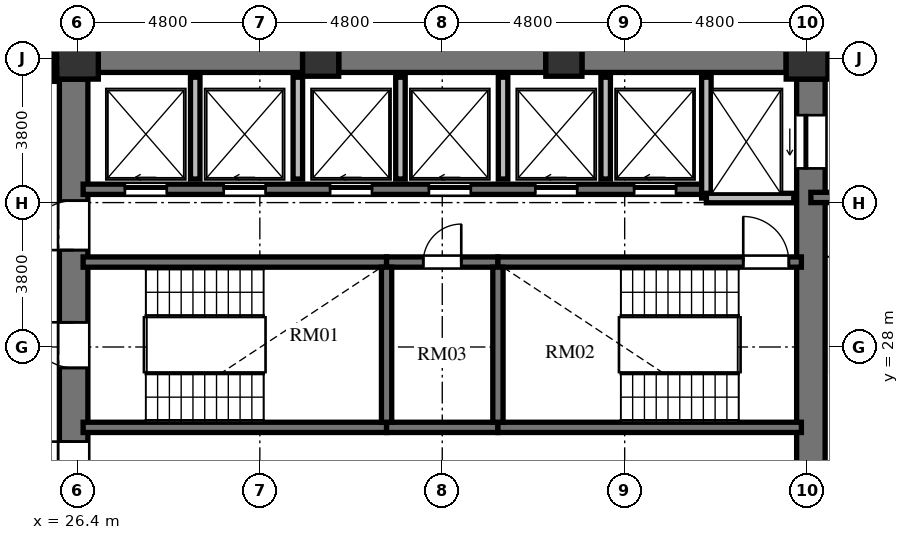
"""IFC4 building model, lengths in metres.
Left out: names, types, materials, properties, quantities, classifications, styles, units other than length and angle.
Written with IfcOpenShell. Run it as: python <this file> out.ifc"""

import sys

from ifc_helpers import new_model, si_unit, direction, frame, frame_2d, origin, origin_2d, place, context, subcontext, project, spatial, rectangle, extrude, element, fill, save


model = new_model("IFC4")
c1 = context("Model", 3, precision=1e-05, world=origin(), true_north=direction((0.0, 1.0)))
c2 = subcontext(c1, "Body", "Model", "MODEL_VIEW")
j1 = project(units=[si_unit("LENGTHUNIT", "METRE"), si_unit("PLANEANGLEUNIT", "RADIAN")], contexts=[c1])
p1 = place(None, origin())
s1 = spatial("IfcSite", under=j1, at=p1, CompositionType="ELEMENT")
p2 = place(p1, origin())
s2 = spatial("IfcBuilding", under=s1, at=p2, CompositionType="ELEMENT")
p3 = place(p2, frame((0.0, 0.0, 118.224)))
s3 = spatial("IfcBuildingStorey", under=s2, at=p3, CompositionType="ELEMENT", Elevation=118.224)
p4 = place(p3, frame((45.6, 35.6, 0.0), z_axis=(0.0, 0.0, 1.0), x_axis=(1.0, 0.0, 0.0)))
e1 = element("IfcColumn", 1, at=p4, inside=s3, PredefinedType="COLUMN", context=c2, shape_type="SweptSolid", body=[
    extrude(rectangle(XDim=1.1, YDim=1.1, at=origin_2d()), origin(), (0.0, 0.0, 1.0), 3.648),
])
for number, where, z_axis, x_axis in (
    (2, (39.2, 35.6, 0.0), (0.0, 0.0, 1.0), (1.0, 0.0, 0.0)),
    (3, (32.8, 35.6, 0.0), (0.0, 0.0, 1.0), (1.0, 0.0, 0.0)),
):
    element("IfcColumn", number, at=place(p3, frame(where, z_axis=z_axis, x_axis=x_axis)), inside=s3, PredefinedType="COLUMN", context=c2, shape_type="SweptSolid", body=[
        extrude(rectangle(XDim=0.95, YDim=0.95, at=origin_2d()), origin(), (0.0, 0.0, 1.0), 3.648),
    ])
p5 = place(p3, frame((26.4, 35.6, 0.0), z_axis=(0.0, 0.0, 1.0), x_axis=(1.0, 0.0, 0.0)))
e4 = element("IfcColumn", 4, at=p5, inside=s3, PredefinedType="COLUMN", context=c2, shape_type="SweptSolid", body=[
    extrude(rectangle(XDim=1.1, YDim=1.1, at=origin_2d()), origin(), (0.0, 0.0, 1.0), 3.648),
])
p6 = place(p3, frame((26.3, 20.95, 0.0), z_axis=(0.0, 0.0, 1.0), x_axis=(0.0, 1.0, 0.0)))
e5 = element("IfcWall", 5, at=p6, inside=s3, PredefinedType="SHEAR", context=c2, shape_type="SweptSolid", body=[
    extrude(rectangle(XDim=14.1, YDim=0.75, at=frame_2d((7.05, 0.0))), origin(), (0.0, 0.0, 1.0), 3.648),
])
p7 = place(p6, frame((6.5, 0.0, 0.0)))
e6 = element("IfcOpeningElement", 6, at=p7, cuts=e5, PredefinedType="OPENING", context=c2, shape_type="SweptSolid", body=[
    extrude(rectangle(XDim=1.2, YDim=2.15, at=frame_2d((0.6, 1.075))), frame((0.0, 0.385, 0.0), z_axis=(0.0, -1.0, 0.0), x_axis=(1.0, 0.0, 0.0)), (0.0, 0.0, 1.0), 0.77),
])
p8 = place(p6, frame((9.6, 0.0, 0.0)))
e7 = element("IfcOpeningElement", 7, at=p8, cuts=e5, PredefinedType="OPENING", context=c2, shape_type="SweptSolid", body=[
    extrude(rectangle(XDim=1.3, YDim=2.2, at=frame_2d((0.65, 1.1))), frame((0.0, 0.385, 0.0), z_axis=(0.0, -1.0, 0.0), x_axis=(1.0, 0.0, 0.0)), (0.0, 0.0, 1.0), 0.77),
])
p9 = place(p6, frame((3.26, 0.0, 0.0)))
e8 = element("IfcOpeningElement", 8, at=p9, cuts=e5, PredefinedType="OPENING", context=c2, shape_type="SweptSolid", body=[
    extrude(rectangle(XDim=1.3, YDim=2.2, at=frame_2d((0.65, 1.1))), frame((0.0, 0.385, 0.0), z_axis=(0.0, -1.0, 0.0), x_axis=(1.0, 0.0, 0.0)), (0.0, 0.0, 1.0), 0.77),
])
p10 = place(p3, frame((45.7, 20.95, 0.0), z_axis=(0.0, 0.0, 1.0), x_axis=(0.0, 1.0, 0.0)))
e9 = element("IfcWall", 9, at=p10, inside=s3, PredefinedType="SHEAR", context=c2, shape_type="SweptSolid", body=[
    extrude(rectangle(XDim=14.1, YDim=0.75, at=frame_2d((7.05, 0.0))), origin(), (0.0, 0.0, 1.0), 3.648),
])
p11 = place(p10, frame((11.75, 0.0, 0.0)))
e10 = element("IfcOpeningElement", 10, at=p11, cuts=e9, PredefinedType="OPENING", context=c2, shape_type="SweptSolid", body=[
    extrude(rectangle(XDim=1.4, YDim=2.3, at=frame_2d((0.7, 1.15))), frame((0.0, 0.385, 0.0), z_axis=(0.0, -1.0, 0.0), x_axis=(1.0, 0.0, 0.0)), (0.0, 0.0, 1.0), 0.77),
])
p12 = place(p10, frame((0.95, 0.0, 0.0)))
e11 = element("IfcOpeningElement", 11, at=p12, cuts=e9, PredefinedType="OPENING", context=c2, shape_type="SweptSolid", body=[
    extrude(rectangle(XDim=1.4, YDim=2.3, at=frame_2d((0.7, 1.15))), frame((0.0, 0.385, 0.0), z_axis=(0.0, -1.0, 0.0), x_axis=(1.0, 0.0, 0.0)), (0.0, 0.0, 1.0), 0.77),
])
p13 = place(p3, frame((26.95, 35.6, 0.0), z_axis=(0.0, 0.0, 1.0), x_axis=(1.0, 0.0, 0.0)))
e12 = element("IfcWall", 12, at=p13, inside=s3, PredefinedType="SHEAR", context=c2, shape_type="SweptSolid", body=[
    extrude(rectangle(XDim=5.375, YDim=0.75, at=frame_2d((2.688, 0.0))), origin(), (0.0, 0.0, 1.0), 3.648),
])
p14 = place(p3, frame((33.275, 35.6, 0.0), z_axis=(0.0, 0.0, 1.0), x_axis=(1.0, 0.0, 0.0)))
e13 = element("IfcWall", 13, at=p14, inside=s3, PredefinedType="SHEAR", context=c2, shape_type="SweptSolid", body=[
    extrude(rectangle(XDim=5.45, YDim=0.75, at=frame_2d((2.725, 0.0))), origin(), (0.0, 0.0, 1.0), 3.648),
])
p15 = place(p3, frame((39.675, 35.6, 0.0), z_axis=(0.0, 0.0, 1.0), x_axis=(1.0, 0.0, 0.0)))
e14 = element("IfcWall", 14, at=p15, inside=s3, PredefinedType="SHEAR", context=c2, shape_type="SweptSolid", body=[
    extrude(rectangle(XDim=5.375, YDim=0.75, at=frame_2d((2.688, 0.0))), origin(), (0.0, 0.0, 1.0), 3.648),
])
p16 = place(p3, frame((26.55, 30.235, 0.0), z_axis=(0.0, 0.0, 1.0), x_axis=(1.0, 0.0, 0.0)))
e15 = element("IfcWall", 15, at=p16, inside=s3, PredefinedType="SHEAR", context=c2, shape_type="SweptSolid", body=[
    extrude(rectangle(XDim=7.985, YDim=0.27, at=frame_2d((3.992, 0.0))), origin(), (0.0, 0.0, 1.0), 3.648),
])
p17 = place(p3, frame((34.535, 30.235, 0.0), z_axis=(0.0, 0.0, 1.0), x_axis=(1.0, 0.0, 0.0)))
e16 = element("IfcWall", 16, at=p17, inside=s3, PredefinedType="SHEAR", context=c2, shape_type="SweptSolid", body=[
    extrude(rectangle(XDim=2.93, YDim=0.27, at=frame_2d((1.465, 0.0))), origin(), (0.0, 0.0, 1.0), 3.648),
])
p18 = place(p17, frame((0.965, 0.0, 0.0)))
e17 = element("IfcOpeningElement", 17, at=p18, cuts=e16, PredefinedType="OPENING", context=c2, shape_type="SweptSolid", body=[
    extrude(rectangle(XDim=1.0, YDim=2.1, at=frame_2d((0.5, 1.05))), frame((0.0, 0.145, 0.0), z_axis=(0.0, -1.0, 0.0), x_axis=(1.0, 0.0, 0.0)), (0.0, 0.0, 1.0), 0.29),
])
p19 = place(p3, frame((37.465, 30.235, 0.0), z_axis=(0.0, 0.0, 1.0), x_axis=(1.0, 0.0, 0.0)))
e18 = element("IfcWall", 18, at=p19, inside=s3, PredefinedType="SHEAR", context=c2, shape_type="SweptSolid", body=[
    extrude(rectangle(XDim=7.985, YDim=0.27, at=frame_2d((3.992, 0.0))), origin(), (0.0, 0.0, 1.0), 3.648),
])
p20 = place(p19, frame((6.455, 0.0, 0.0)))
e19 = element("IfcOpeningElement", 19, at=p20, cuts=e18, PredefinedType="OPENING", context=c2, shape_type="SweptSolid", body=[
    extrude(rectangle(XDim=1.2, YDim=2.15, at=frame_2d((0.6, 1.075))), frame((0.0, 0.145, 0.0), z_axis=(0.0, -1.0, 0.0), x_axis=(1.0, 0.0, 0.0)), (0.0, 0.0, 1.0), 0.29),
])
p21 = place(p3, frame((26.55, 25.885, 0.0), z_axis=(0.0, 0.0, 1.0), x_axis=(1.0, 0.0, 0.0)))
e20 = element("IfcWall", 20, at=p21, inside=s3, PredefinedType="SHEAR", context=c2, shape_type="SweptSolid", body=[
    extrude(rectangle(XDim=7.985, YDim=0.27, at=frame_2d((3.992, 0.0))), origin(), (0.0, 0.0, 1.0), 3.648),
])
p22 = place(p3, frame((34.535, 25.885, 0.0), z_axis=(0.0, 0.0, 1.0), x_axis=(1.0, 0.0, 0.0)))
e21 = element("IfcWall", 21, at=p22, inside=s3, PredefinedType="SHEAR", context=c2, shape_type="SweptSolid", body=[
    extrude(rectangle(XDim=2.93, YDim=0.27, at=frame_2d((1.465, 0.0))), origin(), (0.0, 0.0, 1.0), 3.648),
])
p23 = place(p3, frame((37.465, 25.885, 0.0), z_axis=(0.0, 0.0, 1.0), x_axis=(1.0, 0.0, 0.0)))
e22 = element("IfcWall", 22, at=p23, inside=s3, PredefinedType="SHEAR", context=c2, shape_type="SweptSolid", body=[
    extrude(rectangle(XDim=7.985, YDim=0.27, at=frame_2d((3.992, 0.0))), origin(), (0.0, 0.0, 1.0), 3.648),
])
for number, where, z_axis, x_axis in (
    (23, (34.535, 26.02, 0.0), (0.0, 0.0, 1.0), (0.0, 1.0, 0.0)),
    (24, (37.465, 26.02, 0.0), (0.0, 0.0, 1.0), (0.0, 1.0, 0.0)),
):
    element("IfcWall", number, at=place(p3, frame(where, z_axis=z_axis, x_axis=x_axis)), inside=s3, PredefinedType="SHEAR", context=c2, shape_type="SweptSolid", body=[
        extrude(rectangle(XDim=4.08, YDim=0.27, at=frame_2d((2.04, 0.0))), origin(), (0.0, 0.0, 1.0), 3.648),
    ])
p24 = place(p3, frame((26.55, 32.15, 0.0), z_axis=(0.0, 0.0, 1.0), x_axis=(1.0, 0.0, 0.0)))
e25 = element("IfcWall", 25, at=p24, inside=s3, PredefinedType="SHEAR", context=c2, shape_type="SweptSolid", body=[
    extrude(rectangle(XDim=16.4, YDim=0.27, at=frame_2d((8.2, 0.0))), origin(), (0.0, 0.0, 1.0), 3.648),
])
p25 = place(p24, frame((1.1, 0.0, 0.0)))
e26 = element("IfcOpeningElement", 26, at=p25, cuts=e25, PredefinedType="OPENING", context=c2, shape_type="SweptSolid", body=[
    extrude(rectangle(XDim=1.1, YDim=2.2, at=frame_2d((0.55, 1.1))), frame((0.0, 0.145, 0.0), z_axis=(0.0, -1.0, 0.0), x_axis=(1.0, 0.0, 0.0)), (0.0, 0.0, 1.0), 0.29),
])
p26 = place(p24, frame((3.7, 0.0, 0.0)))
e27 = element("IfcOpeningElement", 27, at=p26, cuts=e25, PredefinedType="OPENING", context=c2, shape_type="SweptSolid", body=[
    extrude(rectangle(XDim=1.1, YDim=2.2, at=frame_2d((0.55, 1.1))), frame((0.0, 0.145, 0.0), z_axis=(0.0, -1.0, 0.0), x_axis=(1.0, 0.0, 0.0)), (0.0, 0.0, 1.0), 0.29),
])
p27 = place(p24, frame((6.5, 0.0, 0.0)))
e28 = element("IfcOpeningElement", 28, at=p27, cuts=e25, PredefinedType="OPENING", context=c2, shape_type="SweptSolid", body=[
    extrude(rectangle(XDim=1.1, YDim=2.2, at=frame_2d((0.55, 1.1))), frame((0.0, 0.145, 0.0), z_axis=(0.0, -1.0, 0.0), x_axis=(1.0, 0.0, 0.0)), (0.0, 0.0, 1.0), 0.29),
])
p28 = place(p24, frame((9.1, 0.0, 0.0)))
e29 = element("IfcOpeningElement", 29, at=p28, cuts=e25, PredefinedType="OPENING", context=c2, shape_type="SweptSolid", body=[
    extrude(rectangle(XDim=1.1, YDim=2.2, at=frame_2d((0.55, 1.1))), frame((0.0, 0.145, 0.0), z_axis=(0.0, -1.0, 0.0), x_axis=(1.0, 0.0, 0.0)), (0.0, 0.0, 1.0), 0.29),
])
p29 = place(p24, frame((11.9, 0.0, 0.0)))
e30 = element("IfcOpeningElement", 30, at=p29, cuts=e25, PredefinedType="OPENING", context=c2, shape_type="SweptSolid", body=[
    extrude(rectangle(XDim=1.1, YDim=2.2, at=frame_2d((0.55, 1.1))), frame((0.0, 0.145, 0.0), z_axis=(0.0, -1.0, 0.0), x_axis=(1.0, 0.0, 0.0)), (0.0, 0.0, 1.0), 0.29),
])
p30 = place(p24, frame((14.5, 0.0, 0.0)))
e31 = element("IfcOpeningElement", 31, at=p30, cuts=e25, PredefinedType="OPENING", context=c2, shape_type="SweptSolid", body=[
    extrude(rectangle(XDim=1.1, YDim=2.2, at=frame_2d((0.55, 1.1))), frame((0.0, 0.145, 0.0), z_axis=(0.0, -1.0, 0.0), x_axis=(1.0, 0.0, 0.0)), (0.0, 0.0, 1.0), 0.29),
])
p31 = place(p3, frame((42.95, 31.92, 0.0), z_axis=(0.0, 0.0, 1.0), x_axis=(0.0, 1.0, 0.0)))
e32 = element("IfcWall", 32, at=p31, inside=s3, PredefinedType="SOLIDWALL", context=c2, shape_type="SweptSolid", body=[
    extrude(rectangle(XDim=3.18, YDim=0.25, at=frame_2d((1.59, 0.0))), origin(), (0.0, 0.0, 1.0), 3.428),
])
p32 = place(p3, frame((42.95, 31.92, 0.0), z_axis=(0.0, 0.0, 1.0), x_axis=(1.0, 0.0, 0.0)))
e33 = element("IfcWall", 33, at=p32, inside=s3, PredefinedType="SOLIDWALL", context=c2, shape_type="SweptSolid", body=[
    extrude(rectangle(XDim=2.3, YDim=0.25, at=frame_2d((1.15, 0.0))), origin(), (0.0, 0.0, 1.0), 3.428),
])
for number, where, z_axis, x_axis in (
    (34, (29.5, 32.42, 0.0), (0.0, 0.0, 1.0), (0.0, 1.0, 0.0)),
    (35, (32.2, 32.42, 0.0), (0.0, 0.0, 1.0), (0.0, 1.0, 0.0)),
    (36, (34.9, 32.42, 0.0), (0.0, 0.0, 1.0), (0.0, 1.0, 0.0)),
    (37, (37.6, 32.42, 0.0), (0.0, 0.0, 1.0), (0.0, 1.0, 0.0)),
    (38, (40.3, 32.42, 0.0), (0.0, 0.0, 1.0), (0.0, 1.0, 0.0)),
):
    element("IfcWall", number, at=place(p3, frame(where, z_axis=z_axis, x_axis=x_axis)), inside=s3, PredefinedType="SOLIDWALL", context=c2, shape_type="SweptSolid", body=[
        extrude(rectangle(XDim=2.68, YDim=0.25, at=frame_2d((1.34, 0.0))), origin(), (0.0, 0.0, 1.0), 3.428),
    ])
p33 = place(p3, frame((45.7, 31.935, 0.0), z_axis=(0.0, 0.0, 1.0), x_axis=(1.0, 0.0, 0.0)))
e39 = element("IfcWall", 39, at=p33, inside=s3, PredefinedType="SHEAR", context=c2, shape_type="SweptSolid", body=[
    extrude(rectangle(XDim=4.715, YDim=0.27, at=frame_2d((2.357, 0.0))), origin(), (0.0, 0.0, 1.0), 3.648),
])
p34 = place(p3, frame((25.83, 36.21, 0.0), z_axis=(0.0, 0.0, 1.0), x_axis=(0.0, -1.0, 0.0)))
e40 = element("IfcWall", 40, at=p34, inside=s3, PredefinedType="PARTITIONING", context=c2, shape_type="SweptSolid", body=[
    extrude(rectangle(XDim=1.22, YDim=0.18, at=frame_2d((0.61, 0.0))), origin(), (0.0, 0.0, 1.0), 3.428),
])
p35 = place(p7, origin())
e41 = element("IfcDoor", 41, at=p35, inside=s3, OperationType="SINGLE_SWING_RIGHT", PredefinedType="DOOR", context=c2, shape_type="SweptSolid", body=[
    extrude(rectangle(XDim=1.2, YDim=2.15, at=frame_2d((0.6, 1.075))), frame((0.0, 0.025, 0.0), z_axis=(0.0, -1.0, 0.0), x_axis=(1.0, 0.0, 0.0)), (0.0, 0.0, 1.0), 0.05),
])
fill(e6, e41)
p36 = place(p20, origin())
e42 = element("IfcDoor", 42, at=p36, inside=s3, OperationType="SINGLE_SWING_LEFT", PredefinedType="DOOR", context=c2, shape_type="SweptSolid", body=[
    extrude(rectangle(XDim=1.2, YDim=2.15, at=frame_2d((0.6, 1.075))), frame((0.0, 0.025, 0.0), z_axis=(0.0, -1.0, 0.0), x_axis=(1.0, 0.0, 0.0)), (0.0, 0.0, 1.0), 0.05),
])
fill(e19, e42)
p37 = place(p18, origin())
e43 = element("IfcDoor", 43, at=p37, inside=s3, OperationType="SINGLE_SWING_RIGHT", PredefinedType="DOOR", context=c2, shape_type="SweptSolid", body=[
    extrude(rectangle(XDim=1.0, YDim=2.1, at=frame_2d((0.5, 1.05))), frame((0.0, 0.025, 0.0), z_axis=(0.0, -1.0, 0.0), x_axis=(1.0, 0.0, 0.0)), (0.0, 0.0, 1.0), 0.05),
])
fill(e17, e43)
p38 = place(p8, origin())
e44 = element("IfcDoor", 44, at=p38, inside=s3, OperationType="SINGLE_SWING_LEFT", PredefinedType="DOOR", context=c2, shape_type="SweptSolid", body=[
    extrude(rectangle(XDim=1.3, YDim=2.2, at=frame_2d((0.65, 1.1))), frame((0.0, 0.025, 0.0), z_axis=(0.0, -1.0, 0.0), x_axis=(1.0, 0.0, 0.0)), (0.0, 0.0, 1.0), 0.05),
])
fill(e7, e44)
p39 = place(p9, origin())
e45 = element("IfcDoor", 45, at=p39, inside=s3, OperationType="SINGLE_SWING_RIGHT", PredefinedType="DOOR", context=c2, shape_type="SweptSolid", body=[
    extrude(rectangle(XDim=1.3, YDim=2.2, at=frame_2d((0.65, 1.1))), frame((0.0, 0.025, 0.0), z_axis=(0.0, -1.0, 0.0), x_axis=(1.0, 0.0, 0.0)), (0.0, 0.0, 1.0), 0.05),
])
fill(e8, e45)
p40 = place(p25, origin())
e46 = element("IfcDoor", 46, at=p40, inside=s3, OperationType="SLIDING_TO_LEFT", PredefinedType="DOOR", context=c2, shape_type="SweptSolid", body=[
    extrude(rectangle(XDim=1.1, YDim=2.2, at=frame_2d((0.55, 1.1))), frame((0.0, 0.025, 0.0), z_axis=(0.0, -1.0, 0.0), x_axis=(1.0, 0.0, 0.0)), (0.0, 0.0, 1.0), 0.05),
])
fill(e26, e46)
p41 = place(p26, origin())
e47 = element("IfcDoor", 47, at=p41, inside=s3, OperationType="SLIDING_TO_LEFT", PredefinedType="DOOR", context=c2, shape_type="SweptSolid", body=[
    extrude(rectangle(XDim=1.1, YDim=2.2, at=frame_2d((0.55, 1.1))), frame((0.0, 0.025, 0.0), z_axis=(0.0, -1.0, 0.0), x_axis=(1.0, 0.0, 0.0)), (0.0, 0.0, 1.0), 0.05),
])
fill(e27, e47)
p42 = place(p27, origin())
e48 = element("IfcDoor", 48, at=p42, inside=s3, OperationType="SLIDING_TO_LEFT", PredefinedType="DOOR", context=c2, shape_type="SweptSolid", body=[
    extrude(rectangle(XDim=1.1, YDim=2.2, at=frame_2d((0.55, 1.1))), frame((0.0, 0.025, 0.0), z_axis=(0.0, -1.0, 0.0), x_axis=(1.0, 0.0, 0.0)), (0.0, 0.0, 1.0), 0.05),
])
fill(e28, e48)
p43 = place(p28, origin())
e49 = element("IfcDoor", 49, at=p43, inside=s3, OperationType="SLIDING_TO_LEFT", PredefinedType="DOOR", context=c2, shape_type="SweptSolid", body=[
    extrude(rectangle(XDim=1.1, YDim=2.2, at=frame_2d((0.55, 1.1))), frame((0.0, 0.025, 0.0), z_axis=(0.0, -1.0, 0.0), x_axis=(1.0, 0.0, 0.0)), (0.0, 0.0, 1.0), 0.05),
])
fill(e29, e49)
p44 = place(p29, origin())
e50 = element("IfcDoor", 50, at=p44, inside=s3, OperationType="SLIDING_TO_LEFT", PredefinedType="DOOR", context=c2, shape_type="SweptSolid", body=[
    extrude(rectangle(XDim=1.1, YDim=2.2, at=frame_2d((0.55, 1.1))), frame((0.0, 0.025, 0.0), z_axis=(0.0, -1.0, 0.0), x_axis=(1.0, 0.0, 0.0)), (0.0, 0.0, 1.0), 0.05),
])
fill(e30, e50)
p45 = place(p30, origin())
e51 = element("IfcDoor", 51, at=p45, inside=s3, OperationType="SLIDING_TO_LEFT", PredefinedType="DOOR", context=c2, shape_type="SweptSolid", body=[
    extrude(rectangle(XDim=1.1, YDim=2.2, at=frame_2d((0.55, 1.1))), frame((0.0, 0.025, 0.0), z_axis=(0.0, -1.0, 0.0), x_axis=(1.0, 0.0, 0.0)), (0.0, 0.0, 1.0), 0.05),
])
fill(e31, e51)
p46 = place(p11, origin())
e52 = element("IfcDoor", 52, at=p46, inside=s3, OperationType="SLIDING_TO_LEFT", PredefinedType="DOOR", context=c2, shape_type="SweptSolid", body=[
    extrude(rectangle(XDim=1.4, YDim=2.3, at=frame_2d((0.7, 1.15))), frame((0.0, 0.025, 0.0), z_axis=(0.0, -1.0, 0.0), x_axis=(1.0, 0.0, 0.0)), (0.0, 0.0, 1.0), 0.05),
])
fill(e10, e52)
save(model, sys.argv[1])
